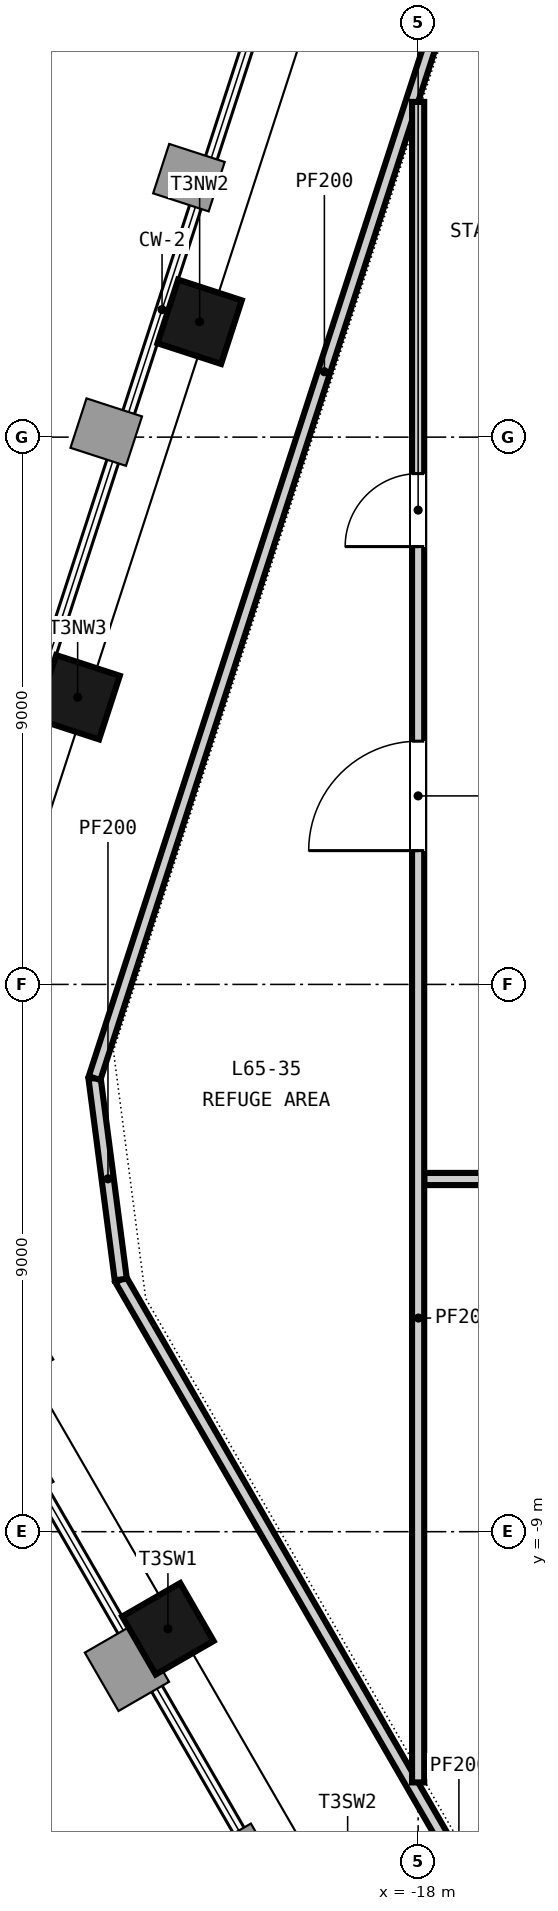
"""IFC4 building model, lengths in metres.
Left out: names, types, materials, properties, quantities, classifications, styles, units other than length and angle.
Written with IfcOpenShell. Run it as: python <this file> out.ifc"""

import sys

from ifc_helpers import new_model, si_unit, direction, frame, frame_2d, origin, origin_2d, place, context, subcontext, project, spatial, rectangle, extrude, element, fill, save


model = new_model("IFC4")
c1 = context("Model", 3, precision=1e-05, world=origin(), true_north=direction((0.0, 1.0)))
c2 = subcontext(c1, "Body", "Model", "MODEL_VIEW")
j1 = project(units=[si_unit("LENGTHUNIT", "METRE"), si_unit("PLANEANGLEUNIT", "RADIAN")], contexts=[c1])
p1 = place(None, origin())
s1 = spatial("IfcSite", under=j1, at=p1, CompositionType="ELEMENT")
p2 = place(p1, origin())
s2 = spatial("IfcBuilding", under=s1, at=p2, CompositionType="ELEMENT")
p3 = place(p2, frame((0.0, 0.0, 256.45)))
s3 = spatial("IfcBuildingStorey", under=s2, at=p3, CompositionType="ELEMENT", Elevation=256.45)
for number, where, z_axis, x_axis in (
    (1, (-21.593, 10.897, -0.3), (0.0, 0.0, 1.0), (-0.309, -0.951, 0.0)),
    (2, (-23.599, 4.723, -0.3), (0.0, 0.0, 1.0), (-0.309, -0.951, 0.0)),
    (3, (-22.115, -10.596, -0.3), (0.0, 0.0, 1.0), (0.5, -0.866, 0.0)),
):
    element("IfcColumn", number, at=place(p3, frame(where, z_axis=z_axis, x_axis=x_axis)), inside=s3, PredefinedType="COLUMN", context=c2, shape_type="SweptSolid", body=[
        extrude(rectangle(XDim=1.1, YDim=1.1, at=origin_2d()), origin(), (0.0, 0.0, 1.0), 4.65),
    ])
p4 = place(p3, frame((-17.9, -3.2, 0.0), z_axis=(0.0, 0.0, 1.0), x_axis=(1.0, 0.0, 0.0)))
e4 = element("IfcWall", 4, at=p4, inside=s3, PredefinedType="PARTITIONING", context=c2, shape_type="SweptSolid", body=[
    extrude(rectangle(XDim=8.8, YDim=0.2, at=frame_2d((4.4, 0.0))), origin(), (0.0, 0.0, 1.0), 4.35),
])
p5 = place(p4, frame((5.3, 0.0, 0.0)))
e5 = element("IfcOpeningElement", 5, at=p5, cuts=e4, PredefinedType="OPENING", context=c2, shape_type="SweptSolid", body=[
    extrude(rectangle(XDim=1.0, YDim=2.1, at=frame_2d((0.5, 1.05))), frame((0.0, 0.11, 0.0), z_axis=(0.0, -1.0, 0.0), x_axis=(1.0, 0.0, 0.0)), (0.0, 0.0, 1.0), 0.22),
])
p6 = place(p3, frame((-18.0, -13.123, 0.0), z_axis=(0.0, 0.0, 1.0), x_axis=(0.0, 1.0, 0.0)))
e6 = element("IfcWall", 6, at=p6, inside=s3, PredefinedType="PARTITIONING", context=c2, shape_type="SweptSolid", body=[
    extrude(rectangle(XDim=27.636, YDim=0.2, at=frame_2d((13.818, 0.0))), origin(), (0.0, 0.0, 1.0), 4.35),
])
p7 = place(p6, frame((15.323, 0.0, 0.0)))
e7 = element("IfcOpeningElement", 7, at=p7, cuts=e6, PredefinedType="OPENING", context=c2, shape_type="SweptSolid", body=[
    extrude(rectangle(XDim=1.8, YDim=2.4, at=frame_2d((0.9, 1.2))), frame((0.0, 0.11, 0.0), z_axis=(0.0, -1.0, 0.0), x_axis=(1.0, 0.0, 0.0)), (0.0, 0.0, 1.0), 0.22),
])
p8 = place(p6, frame((20.323, 0.0, 0.0)))
e8 = element("IfcOpeningElement", 8, at=p8, cuts=e6, PredefinedType="OPENING", context=c2, shape_type="SweptSolid", body=[
    extrude(rectangle(XDim=1.2, YDim=2.1, at=frame_2d((0.6, 1.05))), frame((0.0, 0.11, 0.0), z_axis=(0.0, -1.0, 0.0), x_axis=(1.0, 0.0, 0.0)), (0.0, 0.0, 1.0), 0.22),
])
p9 = place(p3, frame((-11.779, -24.099, 0.0), z_axis=(0.0, 0.0, 1.0), x_axis=(-0.499990944252, 0.86603063206, 0.0)))
e9 = element("IfcWall", 9, at=p9, inside=s3, PredefinedType="PARTITIONING", context=c2, shape_type="SweptSolid", body=[
    extrude(rectangle(XDim=22.223, YDim=0.2, at=frame_2d((11.112, 0.0))), origin(), (0.0, 0.0, 1.0), 4.35),
])
p10 = place(p3, frame((-22.89, -4.853, 0.0), z_axis=(0.0, 0.0, 1.0), x_axis=(-0.129179787742, 0.991621188982, 0.0)))
e10 = element("IfcWall", 10, at=p10, inside=s3, PredefinedType="PARTITIONING", context=c2, shape_type="SweptSolid", body=[
    extrude(rectangle(XDim=3.34, YDim=0.2, at=frame_2d((1.67, 0.0))), origin(), (0.0, 0.0, 1.0), 4.35),
])
p11 = place(p3, frame((-23.322, -1.542, 0.0), z_axis=(0.0, 0.0, 1.0), x_axis=(0.30902054225, 0.951055363513, 0.0)))
e11 = element("IfcWall", 11, at=p11, inside=s3, PredefinedType="PARTITIONING", context=c2, shape_type="SweptSolid", body=[
    extrude(rectangle(XDim=24.431, YDim=0.2, at=frame_2d((12.215, 0.0))), origin(), (0.0, 0.0, 1.0), 4.35),
])
p12 = place(p7, origin())
e12 = element("IfcDoor", 12, at=p12, inside=s3, OperationType="SINGLE_SWING_LEFT", PredefinedType="DOOR", context=c2, shape_type="SweptSolid", body=[
    extrude(rectangle(XDim=1.8, YDim=2.4, at=frame_2d((0.9, 1.2))), frame((0.0, 0.025, 0.0), z_axis=(0.0, -1.0, 0.0), x_axis=(1.0, 0.0, 0.0)), (0.0, 0.0, 1.0), 0.05),
])
fill(e7, e12)
p13 = place(p8, origin())
e13 = element("IfcDoor", 13, at=p13, inside=s3, OperationType="SINGLE_SWING_LEFT", PredefinedType="DOOR", context=c2, shape_type="SweptSolid", body=[
    extrude(rectangle(XDim=1.2, YDim=2.1, at=frame_2d((0.6, 1.05))), frame((0.0, 0.025, 0.0), z_axis=(0.0, -1.0, 0.0), x_axis=(1.0, 0.0, 0.0)), (0.0, 0.0, 1.0), 0.05),
])
fill(e8, e13)
save(model, sys.argv[1])
